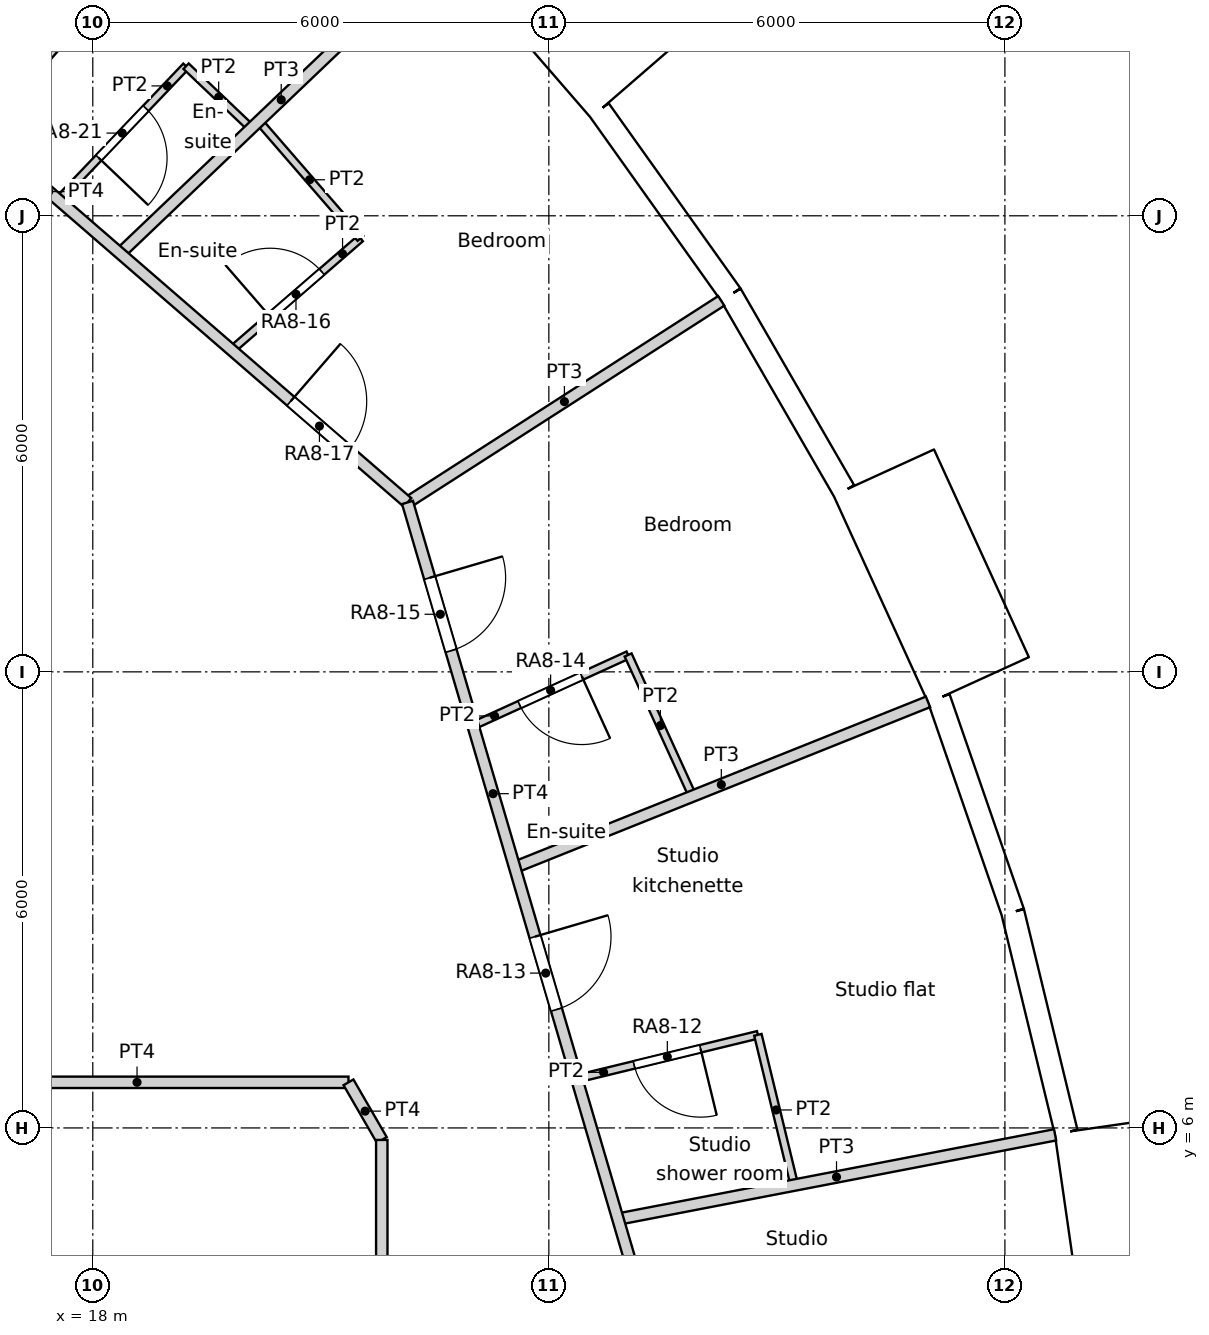
"""IFC4 building model, lengths in metres.
Left out: names, types, materials, properties, quantities, classifications, styles, units other than length and angle.
Written with IfcOpenShell. Run it as: python <this file> out.ifc"""

import sys

from ifc_helpers import new_model, si_unit, direction, frame, frame_2d, origin, origin_2d, place, context, subcontext, project, spatial, rectangle, circle, extrude, element, fill, save


model = new_model("IFC4")
c1 = context("Model", 3, precision=1e-05, world=origin(), true_north=direction((0.0, 1.0)))
c2 = subcontext(c1, "Body", "Model", "MODEL_VIEW")
j1 = project(units=[si_unit("LENGTHUNIT", "METRE"), si_unit("PLANEANGLEUNIT", "RADIAN")], contexts=[c1])
p1 = place(None, origin())
s1 = spatial("IfcSite", under=j1, at=p1, CompositionType="ELEMENT")
p2 = place(p1, origin())
s2 = spatial("IfcBuilding", under=s1, at=p2, CompositionType="ELEMENT")
p3 = place(p2, frame((0.0, 0.0, 103.8)))
s3 = spatial("IfcBuildingStorey", under=s2, at=p3, CompositionType="ELEMENT", Elevation=103.8)
for number, where, z_axis, x_axis in (
    (1, (29.728, 5.729, 0.0), (0.0, 0.0, 1.0), (1.0, 0.0, 0.0)),
    (2, (28.106, 11.252, 0.0), (0.0, 0.0, 1.0), (1.0, 0.0, 0.0)),
    (3, (25.469, 16.368, 0.0), (0.0, 0.0, 1.0), (1.0, 0.0, 0.0)),
):
    element("IfcColumn", number, at=place(p3, frame(where, z_axis=z_axis, x_axis=x_axis)), inside=s3, PredefinedType="COLUMN", context=c2, shape_type="SweptSolid", body=[
        extrude(circle(Radius=0.6, at=origin_2d()), origin(), (0.0, 0.0, 1.0), 3.6),
    ])
for number, where, z_axis, x_axis in (
    (4, (23.886, 5.661, 0.0), (0.0, 0.0, 1.0), (1.0, 0.0, 0.0)),
    (5, (21.937, 11.017, 0.0), (0.0, 0.0, 1.0), (1.0, 0.0, 0.0)),
    (6, (18.805, 15.779, 0.0), (0.0, 0.0, 1.0), (1.0, 0.0, 0.0)),
):
    element("IfcColumn", number, at=place(p3, frame(where, z_axis=z_axis, x_axis=x_axis)), inside=s3, PredefinedType="COLUMN", context=c2, shape_type="SweptSolid", body=[
        extrude(circle(Radius=0.65, at=origin_2d()), origin(), (0.0, 0.0, 1.0), 3.6),
    ])
p4 = place(p3, frame((17.986, 5.548, 0.0), z_axis=(0.0, 0.0, 1.0), x_axis=(1.0, 0.0, 0.0)))
e7 = element("IfcColumn", 7, at=p4, inside=s3, PredefinedType="COLUMN", context=c2, shape_type="SweptSolid", body=[
    extrude(circle(Radius=0.7, at=origin_2d()), origin(), (0.0, 0.0, 1.0), 3.6),
])
p5 = place(p3, frame((31.802, 3.057, -0.45), z_axis=(0.0, 0.0, 1.0), x_axis=(-0.142332746704, 0.989818866872, 0.0)))
e8 = element("IfcWall", 8, at=p5, inside=s3, PredefinedType="ELEMENTEDWALL", context=c2, shape_type="SweptSolid", body=[
    extrude(rectangle(XDim=3.0, YDim=1.45, at=frame_2d((1.5, 0.0))), origin(), (0.0, 0.0, 1.0), 3.6),
])
p6 = place(p5, frame((1.5, 0.0, 2.0)))
e9 = element("IfcOpeningElement", 9, at=p6, cuts=e8, PredefinedType="OPENING", context=c2, shape_type="SweptSolid", body=[
    extrude(circle(Radius=0.9, at=origin_2d()), frame((0.0, 0.735, 0.0), z_axis=(0.0, -1.0, 0.0), x_axis=(1.0, 0.0, 0.0)), (0.0, 0.0, 1.0), 1.47),
])
p7 = place(p3, frame((30.806, 5.944, 0.0), z_axis=(0.0, 0.0, 1.0), x_axis=(-0.235743081534, 0.971815414319, 0.0)))
e10 = element("IfcWall", 10, at=p7, inside=s3, PredefinedType="SOLIDWALL", context=c2, shape_type="SweptSolid", body=[
    extrude(rectangle(XDim=2.979, YDim=0.3, at=frame_2d((1.49, 0.0))), origin(), (0.0, 0.0, 1.0), 3.15),
])
p8 = place(p7, frame((1.49, 0.0, 1.55)))
e11 = element("IfcOpeningElement", 11, at=p8, cuts=e10, PredefinedType="OPENING", context=c2, shape_type="SweptSolid", body=[
    extrude(circle(Radius=0.9, at=origin_2d()), frame((0.0, 0.16, 0.0), z_axis=(0.0, -1.0, 0.0), x_axis=(1.0, 0.0, 0.0)), (0.0, 0.0, 1.0), 0.32),
])
p9 = place(p3, frame((30.104, 8.839, 0.0), z_axis=(0.0, 0.0, 1.0), x_axis=(-0.327071167136, 0.944999709856, 0.0)))
e12 = element("IfcWall", 12, at=p9, inside=s3, PredefinedType="SOLIDWALL", context=c2, shape_type="SweptSolid", body=[
    extrude(rectangle(XDim=2.98, YDim=0.3, at=frame_2d((1.49, 0.0))), origin(), (0.0, 0.0, 1.0), 3.15),
])
p10 = place(p9, frame((1.49, 0.0, 1.55)))
e13 = element("IfcOpeningElement", 13, at=p10, cuts=e12, PredefinedType="OPENING", context=c2, shape_type="SweptSolid", body=[
    extrude(circle(Radius=0.9, at=origin_2d()), frame((0.0, 0.16, 0.0), z_axis=(0.0, -1.0, 0.0), x_axis=(1.0, 0.0, 0.0)), (0.0, 0.0, 1.0), 0.32),
])
p11 = place(p3, frame((29.653, 11.893, -0.45), z_axis=(0.0, 0.0, 1.0), x_axis=(-0.415427028395, 0.909626508012, 0.0)))
e14 = element("IfcWall", 14, at=p11, inside=s3, PredefinedType="ELEMENTEDWALL", context=c2, shape_type="SweptSolid", body=[
    extrude(rectangle(XDim=3.0, YDim=1.45, at=frame_2d((1.5, 0.0))), origin(), (0.0, 0.0, 1.0), 3.6),
])
p12 = place(p11, frame((1.5, 0.0, 2.0)))
e15 = element("IfcOpeningElement", 15, at=p12, cuts=e14, PredefinedType="OPENING", context=c2, shape_type="SweptSolid", body=[
    extrude(circle(Radius=0.9, at=origin_2d()), frame((0.0, 0.735, 0.0), z_axis=(0.0, -1.0, 0.0), x_axis=(1.0, 0.0, 0.0)), (0.0, 0.0, 1.0), 1.47),
])
p13 = place(p3, frame((27.884, 14.382, 0.0), z_axis=(0.0, 0.0, 1.0), x_axis=(-0.500025049464, 0.866010940986, 0.0)))
e16 = element("IfcWall", 16, at=p13, inside=s3, PredefinedType="SOLIDWALL", context=c2, shape_type="SweptSolid", body=[
    extrude(rectangle(XDim=2.98, YDim=0.3, at=frame_2d((1.49, 0.0))), origin(), (0.0, 0.0, 1.0), 3.15),
])
p14 = place(p13, frame((1.49, 0.0, 1.55)))
e17 = element("IfcOpeningElement", 17, at=p14, cuts=e16, PredefinedType="OPENING", context=c2, shape_type="SweptSolid", body=[
    extrude(circle(Radius=0.9, at=origin_2d()), frame((0.0, 0.16, 0.0), z_axis=(0.0, -1.0, 0.0), x_axis=(1.0, 0.0, 0.0)), (0.0, 0.0, 1.0), 0.32),
])
p15 = place(p3, frame((26.394, 16.962, 0.0), z_axis=(0.0, 0.0, 1.0), x_axis=(-0.580059407678, 0.81457417315, 0.0)))
e18 = element("IfcWall", 18, at=p15, inside=s3, PredefinedType="SOLIDWALL", context=c2, shape_type="SweptSolid", body=[
    extrude(rectangle(XDim=2.979, YDim=0.3, at=frame_2d((1.49, 0.0))), origin(), (0.0, 0.0, 1.0), 3.15),
])
p16 = place(p15, frame((1.49, 0.0, 1.55)))
e19 = element("IfcOpeningElement", 19, at=p16, cuts=e18, PredefinedType="OPENING", context=c2, shape_type="SweptSolid", body=[
    extrude(circle(Radius=0.9, at=origin_2d()), frame((0.0, 0.16, 0.0), z_axis=(0.0, -1.0, 0.0), x_axis=(1.0, 0.0, 0.0)), (0.0, 0.0, 1.0), 0.32),
])
p17 = place(p3, frame((25.101, 19.766, -0.45), z_axis=(0.0, 0.0, 1.0), x_axis=(-0.654890259022, 0.75572398972, 0.0)))
e20 = element("IfcWall", 20, at=p17, inside=s3, PredefinedType="ELEMENTEDWALL", context=c2, shape_type="SweptSolid", body=[
    extrude(rectangle(XDim=3.0, YDim=1.45, at=frame_2d((1.5, 0.0))), origin(), (0.0, 0.0, 1.0), 3.6),
])
p18 = place(p17, frame((1.5, 0.0, 2.0)))
e21 = element("IfcOpeningElement", 21, at=p18, cuts=e20, PredefinedType="OPENING", context=c2, shape_type="SweptSolid", body=[
    extrude(circle(Radius=0.9, at=origin_2d()), frame((0.0, 0.735, 0.0), z_axis=(0.0, -1.0, 0.0), x_axis=(1.0, 0.0, 0.0)), (0.0, 0.0, 1.0), 1.47),
])
p19 = place(p3, frame((21.802, -5.842, 0.0), z_axis=(0.0, 0.0, 1.0), x_axis=(0.0, 1.0, 0.0)))
e22 = element("IfcWall", 22, at=p19, inside=s3, PredefinedType="PARTITIONING", context=c2, shape_type="SweptSolid", body=[
    extrude(rectangle(XDim=11.684, YDim=0.15, at=frame_2d((5.842, 0.0))), origin(), (0.0, 0.0, 1.0), 3.15),
])
p20 = place(p3, frame((21.364, 6.6, 0.0), z_axis=(0.0, 0.0, 1.0), x_axis=(0.500277597875, -0.865865073245, 0.0)))
e23 = element("IfcWall", 23, at=p20, inside=s3, PredefinedType="PARTITIONING", context=c2, shape_type="SweptSolid", body=[
    extrude(rectangle(XDim=0.875, YDim=0.15, at=frame_2d((0.438, 0.0))), origin(), (0.0, 0.0, 1.0), 3.15),
])
p21 = place(p3, frame((15.8, 6.6, 0.0), z_axis=(0.0, 0.0, 1.0), x_axis=(1.0, 0.0, 0.0)))
e24 = element("IfcWall", 24, at=p21, inside=s3, PredefinedType="PARTITIONING", context=c2, shape_type="SweptSolid", body=[
    extrude(rectangle(XDim=5.564, YDim=0.15, at=frame_2d((2.782, 0.0))), origin(), (0.0, 0.0, 1.0), 3.15),
])
p22 = place(p3, frame((22.14, 14.229, 0.0), z_axis=(0.0, 0.0, 1.0), x_axis=(0.281780364869, -0.959478934617, 0.0)))
e25 = element("IfcWall", 25, at=p22, inside=s3, PredefinedType="PARTITIONING", context=c2, shape_type="SweptSolid", body=[
    extrude(rectangle(XDim=14.83, YDim=0.15, at=frame_2d((7.415, 0.0))), origin(), (0.0, 0.0, 1.0), 3.15),
])
p23 = place(p22, frame((10.816, 0.0, 0.0)))
e26 = element("IfcOpeningElement", 26, at=p23, cuts=e25, PredefinedType="OPENING", context=c2, shape_type="SweptSolid", body=[
    extrude(rectangle(XDim=1.0, YDim=2.1, at=frame_2d((0.5, 1.05))), frame((0.0, 0.075, 0.0), z_axis=(0.0, -1.0, 0.0), x_axis=(1.0, 0.0, 0.0)), (0.0, 0.0, 1.0), 0.15),
])
p24 = place(p22, frame((5.953, 0.0, 0.0)))
e27 = element("IfcOpeningElement", 27, at=p24, cuts=e25, PredefinedType="OPENING", context=c2, shape_type="SweptSolid", body=[
    extrude(rectangle(XDim=1.0, YDim=2.1, at=frame_2d((0.5, 1.05))), frame((0.0, 0.075, 0.0), z_axis=(0.0, -1.0, 0.0), x_axis=(1.0, 0.0, 0.0)), (0.0, 0.0, 1.0), 0.15),
])
p25 = place(p22, frame((1.033, 0.0, 0.0)))
e28 = element("IfcOpeningElement", 28, at=p25, cuts=e25, PredefinedType="OPENING", context=c2, shape_type="SweptSolid", body=[
    extrude(rectangle(XDim=1.0, YDim=2.1, at=frame_2d((0.5, 1.05))), frame((0.0, 0.075, 0.0), z_axis=(0.0, -1.0, 0.0), x_axis=(1.0, 0.0, 0.0)), (0.0, 0.0, 1.0), 0.15),
])
p26 = place(p3, frame((10.932, 23.939, 0.0), z_axis=(0.0, 0.0, 1.0), x_axis=(0.755838982892, -0.654757536757, 0.0)))
e29 = element("IfcWall", 29, at=p26, inside=s3, PredefinedType="PARTITIONING", context=c2, shape_type="SweptSolid", body=[
    extrude(rectangle(XDim=14.83, YDim=0.15, at=frame_2d((7.415, 0.0))), origin(), (0.0, 0.0, 1.0), 3.15),
])
p27 = place(p26, frame((12.796, 0.0, 0.0)))
e30 = element("IfcOpeningElement", 30, at=p27, cuts=e29, PredefinedType="OPENING", context=c2, shape_type="SweptSolid", body=[
    extrude(rectangle(XDim=1.0, YDim=2.1, at=frame_2d((0.5, 1.05))), frame((0.0, 0.075, 0.0), z_axis=(0.0, -1.0, 0.0), x_axis=(1.0, 0.0, 0.0)), (0.0, 0.0, 1.0), 0.15),
])
p28 = place(p26, frame((3.472, 0.0, 0.0)))
e31 = element("IfcOpeningElement", 31, at=p28, cuts=e29, PredefinedType="OPENING", context=c2, shape_type="SweptSolid", body=[
    extrude(rectangle(XDim=1.1, YDim=2.1, at=frame_2d((0.55, 1.05))), frame((0.0, 0.075, 0.0), z_axis=(0.0, -1.0, 0.0), x_axis=(1.0, 0.0, 0.0)), (0.0, 0.0, 1.0), 0.15),
])
p29 = place(p3, frame((24.909, 4.8, 0.0), z_axis=(0.0, 0.0, 1.0), x_axis=(0.981912070464, 0.189337492, 0.0)))
e32 = element("IfcWall", 32, at=p29, inside=s3, PredefinedType="PARTITIONING", context=c2, shape_type="SweptSolid", body=[
    extrude(rectangle(XDim=5.857, YDim=0.15, at=frame_2d((2.928, 0.0))), origin(), (0.0, 0.0, 1.0), 3.15),
])
p30 = place(p3, frame((26.75, 7.225, 0.0), z_axis=(0.0, 0.0, 1.0), x_axis=(0.23592286129, -0.97177178572, 0.0)))
e33 = element("IfcWall", 33, at=p30, inside=s3, PredefinedType="PARTITIONING", context=c2, shape_type="SweptSolid", body=[
    extrude(rectangle(XDim=2.034, YDim=0.1, at=frame_2d((1.017, 0.0))), origin(), (0.0, 0.0, 1.0), 3.15),
])
p31 = place(p3, frame((24.367, 6.646, 0.0), z_axis=(0.0, 0.0, 1.0), x_axis=(0.971720101056, 0.236135650006, 0.0)))
e34 = element("IfcWall", 34, at=p31, inside=s3, PredefinedType="PARTITIONING", context=c2, shape_type="SweptSolid", body=[
    extrude(rectangle(XDim=2.452, YDim=0.1, at=frame_2d((1.226, 0.0))), origin(), (0.0, 0.0, 1.0), 3.15),
])
p32 = place(p31, frame((0.776, 0.0, 0.0)))
e35 = element("IfcOpeningElement", 35, at=p32, cuts=e34, PredefinedType="OPENING", context=c2, shape_type="SweptSolid", body=[
    extrude(rectangle(XDim=0.9, YDim=2.04, at=frame_2d((0.45, 1.02))), frame((0.0, 0.05, 0.0), z_axis=(0.0, -1.0, 0.0), x_axis=(1.0, 0.0, 0.0)), (0.0, 0.0, 1.0), 0.1),
])
p33 = place(p3, frame((23.55, 9.428, 0.0), z_axis=(0.0, 0.0, 1.0), x_axis=(0.9283702981, 0.371656547911, 0.0)))
e36 = element("IfcWall", 36, at=p33, inside=s3, PredefinedType="PARTITIONING", context=c2, shape_type="SweptSolid", body=[
    extrude(rectangle(XDim=5.858, YDim=0.15, at=frame_2d((2.929, 0.0))), origin(), (0.0, 0.0, 1.0), 3.15),
])
p34 = place(p3, frame((25.043, 12.222, 0.0), z_axis=(0.0, 0.0, 1.0), x_axis=(0.41546015385, -0.909611378866, 0.0)))
e37 = element("IfcWall", 37, at=p34, inside=s3, PredefinedType="PARTITIONING", context=c2, shape_type="SweptSolid", body=[
    extrude(rectangle(XDim=2.042, YDim=0.1, at=frame_2d((1.021, 0.0))), origin(), (0.0, 0.0, 1.0), 3.15),
])
p35 = place(p3, frame((23.003, 11.291, 0.0), z_axis=(0.0, 0.0, 1.0), x_axis=(0.90975773562, 0.41513956988, 0.0)))
e38 = element("IfcWall", 38, at=p35, inside=s3, PredefinedType="PARTITIONING", context=c2, shape_type="SweptSolid", body=[
    extrude(rectangle(XDim=2.242, YDim=0.1, at=frame_2d((1.121, 0.0))), origin(), (0.0, 0.0, 1.0), 3.15),
])
p36 = place(p35, frame((0.671, 0.0, 0.0)))
e39 = element("IfcOpeningElement", 39, at=p36, cuts=e38, PredefinedType="OPENING", context=c2, shape_type="SweptSolid", body=[
    extrude(rectangle(XDim=0.9, YDim=2.04, at=frame_2d((0.45, 1.02))), frame((0.0, 0.05, 0.0), z_axis=(0.0, -1.0, 0.0), x_axis=(1.0, 0.0, 0.0)), (0.0, 0.0, 1.0), 0.1),
])
p37 = place(p3, frame((22.141, 14.229, 0.0), z_axis=(0.0, 0.0, 1.0), x_axis=(0.841265781699, 0.540621757371, 0.0)))
e40 = element("IfcWall", 40, at=p37, inside=s3, PredefinedType="PARTITIONING", context=c2, shape_type="SweptSolid", body=[
    extrude(rectangle(XDim=4.906, YDim=0.15, at=frame_2d((2.453, 0.0))), origin(), (0.0, 0.0, 1.0), 3.15),
])
p38 = place(p3, frame((19.826, 16.234, 0.0), z_axis=(0.0, 0.0, 1.0), x_axis=(0.755703447798, 0.654913963042, 0.0)))
e41 = element("IfcWall", 41, at=p38, inside=s3, PredefinedType="PARTITIONING", context=c2, shape_type="SweptSolid", body=[
    extrude(rectangle(XDim=2.243, YDim=0.1, at=frame_2d((1.122, 0.0))), origin(), (0.0, 0.0, 1.0), 3.15),
])
p39 = place(p38, frame((0.671, 0.0, 0.0)))
e42 = element("IfcOpeningElement", 42, at=p39, cuts=e41, PredefinedType="OPENING", context=c2, shape_type="SweptSolid", body=[
    extrude(rectangle(XDim=0.9, YDim=2.04, at=frame_2d((0.45, 1.02))), frame((0.0, 0.05, 0.0), z_axis=(0.0, -1.0, 0.0), x_axis=(1.0, 0.0, 0.0)), (0.0, 0.0, 1.0), 0.1),
])
p40 = place(p3, frame((20.184, 19.245, 0.0), z_axis=(0.0, 0.0, 1.0), x_axis=(0.655017058368, -0.755614090159, 0.0)))
e43 = element("IfcWall", 43, at=p40, inside=s3, PredefinedType="PARTITIONING", context=c2, shape_type="SweptSolid", body=[
    extrude(rectangle(XDim=2.041, YDim=0.1, at=frame_2d((1.021, 0.0))), origin(), (0.0, 0.0, 1.0), 3.15),
])
p41 = place(p3, frame((18.36, 17.505, 0.0), z_axis=(0.0, 0.0, 1.0), x_axis=(0.723686703731, 0.690128650937, 0.0)))
e44 = element("IfcWall", 44, at=p41, inside=s3, PredefinedType="PARTITIONING", context=c2, shape_type="SweptSolid", body=[
    extrude(rectangle(XDim=5.856, YDim=0.15, at=frame_2d((2.928, 0.0))), origin(), (0.0, 0.0, 1.0), 3.15),
])
p42 = place(p3, frame((16.537, 19.085, 0.0), z_axis=(0.0, 0.0, 1.0), x_axis=(0.654922216086, 0.755696295397, 0.0)))
e45 = element("IfcWall", 45, at=p42, inside=s3, PredefinedType="PARTITIONING", context=c2, shape_type="SweptSolid", body=[
    extrude(rectangle(XDim=2.234, YDim=0.1, at=frame_2d((1.117, 0.0))), origin(), (0.0, 0.0, 1.0), 3.15),
])
p43 = place(p3, frame((19.227, 19.968, 0.0), z_axis=(0.0, 0.0, 1.0), x_axis=(0.724103627225, -0.68969118962, 0.0)))
e46 = element("IfcWall", 46, at=p43, inside=s3, PredefinedType="PARTITIONING", context=c2, shape_type="SweptSolid", body=[
    extrude(rectangle(XDim=1.185, YDim=0.1, at=frame_2d((0.592, 0.0))), origin(), (0.0, 0.0, 1.0), 3.15),
])
p44 = place(p3, frame((17.549, 18.208, 0.0), z_axis=(0.0, 0.0, 1.0), x_axis=(0.690038643162, 0.723772527071, 0.0)))
e47 = element("IfcWall", 47, at=p44, inside=s3, PredefinedType="PARTITIONING", context=c2, shape_type="SweptSolid", body=[
    extrude(rectangle(XDim=2.432, YDim=0.1, at=frame_2d((1.216, 0.0))), origin(), (0.0, 0.0, 1.0), 3.15),
])
p45 = place(p44, frame((0.766, 0.0, 0.0)))
e48 = element("IfcOpeningElement", 48, at=p45, cuts=e47, PredefinedType="OPENING", context=c2, shape_type="SweptSolid", body=[
    extrude(rectangle(XDim=0.9, YDim=2.04, at=frame_2d((0.45, 1.02))), frame((0.0, 0.05, 0.0), z_axis=(0.0, -1.0, 0.0), x_axis=(1.0, 0.0, 0.0)), (0.0, 0.0, 1.0), 0.1),
])
p46 = place(p6, origin())
e49 = element("IfcWindow", 49, at=p46, inside=s3, PartitioningType="SINGLE_PANEL", PredefinedType="WINDOW", context=c2, shape_type="SweptSolid", body=[
    extrude(circle(Radius=0.9, at=origin_2d()), frame((0.0, 0.695, 0.0), z_axis=(0.0, -1.0, 0.0), x_axis=(1.0, 0.0, 0.0)), (0.0, 0.0, 1.0), 0.1),
])
fill(e9, e49)
p47 = place(p8, origin())
e50 = element("IfcWindow", 50, at=p47, inside=s3, PartitioningType="SINGLE_PANEL", PredefinedType="WINDOW", context=c2, shape_type="SweptSolid", body=[
    extrude(circle(Radius=0.9, at=origin_2d()), frame((0.0, 0.12, 0.0), z_axis=(0.0, -1.0, 0.0), x_axis=(1.0, 0.0, 0.0)), (0.0, 0.0, 1.0), 0.1),
])
fill(e11, e50)
p48 = place(p10, origin())
e51 = element("IfcWindow", 51, at=p48, inside=s3, PartitioningType="SINGLE_PANEL", PredefinedType="WINDOW", context=c2, shape_type="SweptSolid", body=[
    extrude(circle(Radius=0.9, at=origin_2d()), frame((0.0, 0.12, 0.0), z_axis=(0.0, -1.0, 0.0), x_axis=(1.0, 0.0, 0.0)), (0.0, 0.0, 1.0), 0.1),
])
fill(e13, e51)
p49 = place(p12, origin())
e52 = element("IfcWindow", 52, at=p49, inside=s3, PartitioningType="SINGLE_PANEL", PredefinedType="WINDOW", context=c2, shape_type="SweptSolid", body=[
    extrude(circle(Radius=0.9, at=origin_2d()), frame((0.0, 0.695, 0.0), z_axis=(0.0, -1.0, 0.0), x_axis=(1.0, 0.0, 0.0)), (0.0, 0.0, 1.0), 0.1),
])
fill(e15, e52)
p50 = place(p14, origin())
e53 = element("IfcWindow", 53, at=p50, inside=s3, PartitioningType="SINGLE_PANEL", PredefinedType="WINDOW", context=c2, shape_type="SweptSolid", body=[
    extrude(circle(Radius=0.9, at=origin_2d()), frame((0.0, 0.12, 0.0), z_axis=(0.0, -1.0, 0.0), x_axis=(1.0, 0.0, 0.0)), (0.0, 0.0, 1.0), 0.1),
])
fill(e17, e53)
p51 = place(p16, origin())
e54 = element("IfcWindow", 54, at=p51, inside=s3, PartitioningType="SINGLE_PANEL", PredefinedType="WINDOW", context=c2, shape_type="SweptSolid", body=[
    extrude(circle(Radius=0.9, at=origin_2d()), frame((0.0, 0.12, 0.0), z_axis=(0.0, -1.0, 0.0), x_axis=(1.0, 0.0, 0.0)), (0.0, 0.0, 1.0), 0.1),
])
fill(e19, e54)
p52 = place(p18, origin())
e55 = element("IfcWindow", 55, at=p52, inside=s3, PartitioningType="SINGLE_PANEL", PredefinedType="WINDOW", context=c2, shape_type="SweptSolid", body=[
    extrude(circle(Radius=0.9, at=origin_2d()), frame((0.0, 0.695, 0.0), z_axis=(0.0, -1.0, 0.0), x_axis=(1.0, 0.0, 0.0)), (0.0, 0.0, 1.0), 0.1),
])
fill(e21, e55)
p53 = place(p32, origin())
e56 = element("IfcDoor", 56, at=p53, inside=s3, OperationType="SINGLE_SWING_LEFT", PredefinedType="DOOR", context=c2, shape_type="SweptSolid", body=[
    extrude(rectangle(XDim=0.9, YDim=2.04, at=frame_2d((0.45, 1.02))), frame((0.0, 0.025, 0.0), z_axis=(0.0, -1.0, 0.0), x_axis=(1.0, 0.0, 0.0)), (0.0, 0.0, 1.0), 0.05),
])
fill(e35, e56)
p54 = place(p24, origin())
e57 = element("IfcDoor", 57, at=p54, inside=s3, OperationType="SINGLE_SWING_LEFT", PredefinedType="DOOR", context=c2, shape_type="SweptSolid", body=[
    extrude(rectangle(XDim=1.0, YDim=2.1, at=frame_2d((0.5, 1.05))), frame((0.0, 0.025, 0.0), z_axis=(0.0, -1.0, 0.0), x_axis=(1.0, 0.0, 0.0)), (0.0, 0.0, 1.0), 0.05),
])
fill(e27, e57)
p55 = place(p36, origin())
e58 = element("IfcDoor", 58, at=p55, inside=s3, OperationType="SINGLE_SWING_LEFT", PredefinedType="DOOR", context=c2, shape_type="SweptSolid", body=[
    extrude(rectangle(XDim=0.9, YDim=2.04, at=frame_2d((0.45, 1.02))), frame((0.0, 0.025, 0.0), z_axis=(0.0, -1.0, 0.0), x_axis=(1.0, 0.0, 0.0)), (0.0, 0.0, 1.0), 0.05),
])
fill(e39, e58)
p56 = place(p25, origin())
e59 = element("IfcDoor", 59, at=p56, inside=s3, OperationType="SINGLE_SWING_LEFT", PredefinedType="DOOR", context=c2, shape_type="SweptSolid", body=[
    extrude(rectangle(XDim=1.0, YDim=2.1, at=frame_2d((0.5, 1.05))), frame((0.0, 0.025, 0.0), z_axis=(0.0, -1.0, 0.0), x_axis=(1.0, 0.0, 0.0)), (0.0, 0.0, 1.0), 0.05),
])
fill(e28, e59)
p57 = place(p39, origin())
e60 = element("IfcDoor", 60, at=p57, inside=s3, OperationType="SINGLE_SWING_LEFT", PredefinedType="DOOR", context=c2, shape_type="SweptSolid", body=[
    extrude(rectangle(XDim=0.9, YDim=2.04, at=frame_2d((0.45, 1.02))), frame((0.0, 0.025, 0.0), z_axis=(0.0, -1.0, 0.0), x_axis=(1.0, 0.0, 0.0)), (0.0, 0.0, 1.0), 0.05),
])
fill(e42, e60)
p58 = place(p27, origin())
e61 = element("IfcDoor", 61, at=p58, inside=s3, OperationType="SINGLE_SWING_LEFT", PredefinedType="DOOR", context=c2, shape_type="SweptSolid", body=[
    extrude(rectangle(XDim=1.0, YDim=2.1, at=frame_2d((0.5, 1.05))), frame((0.0, 0.025, 0.0), z_axis=(0.0, -1.0, 0.0), x_axis=(1.0, 0.0, 0.0)), (0.0, 0.0, 1.0), 0.05),
])
fill(e30, e61)
p59 = place(p45, origin())
e62 = element("IfcDoor", 62, at=p59, inside=s3, OperationType="SINGLE_SWING_RIGHT", PredefinedType="DOOR", context=c2, shape_type="SweptSolid", body=[
    extrude(rectangle(XDim=0.9, YDim=2.04, at=frame_2d((0.45, 1.02))), frame((0.0, 0.025, 0.0), z_axis=(0.0, -1.0, 0.0), x_axis=(1.0, 0.0, 0.0)), (0.0, 0.0, 1.0), 0.05),
])
fill(e48, e62)
save(model, sys.argv[1])
